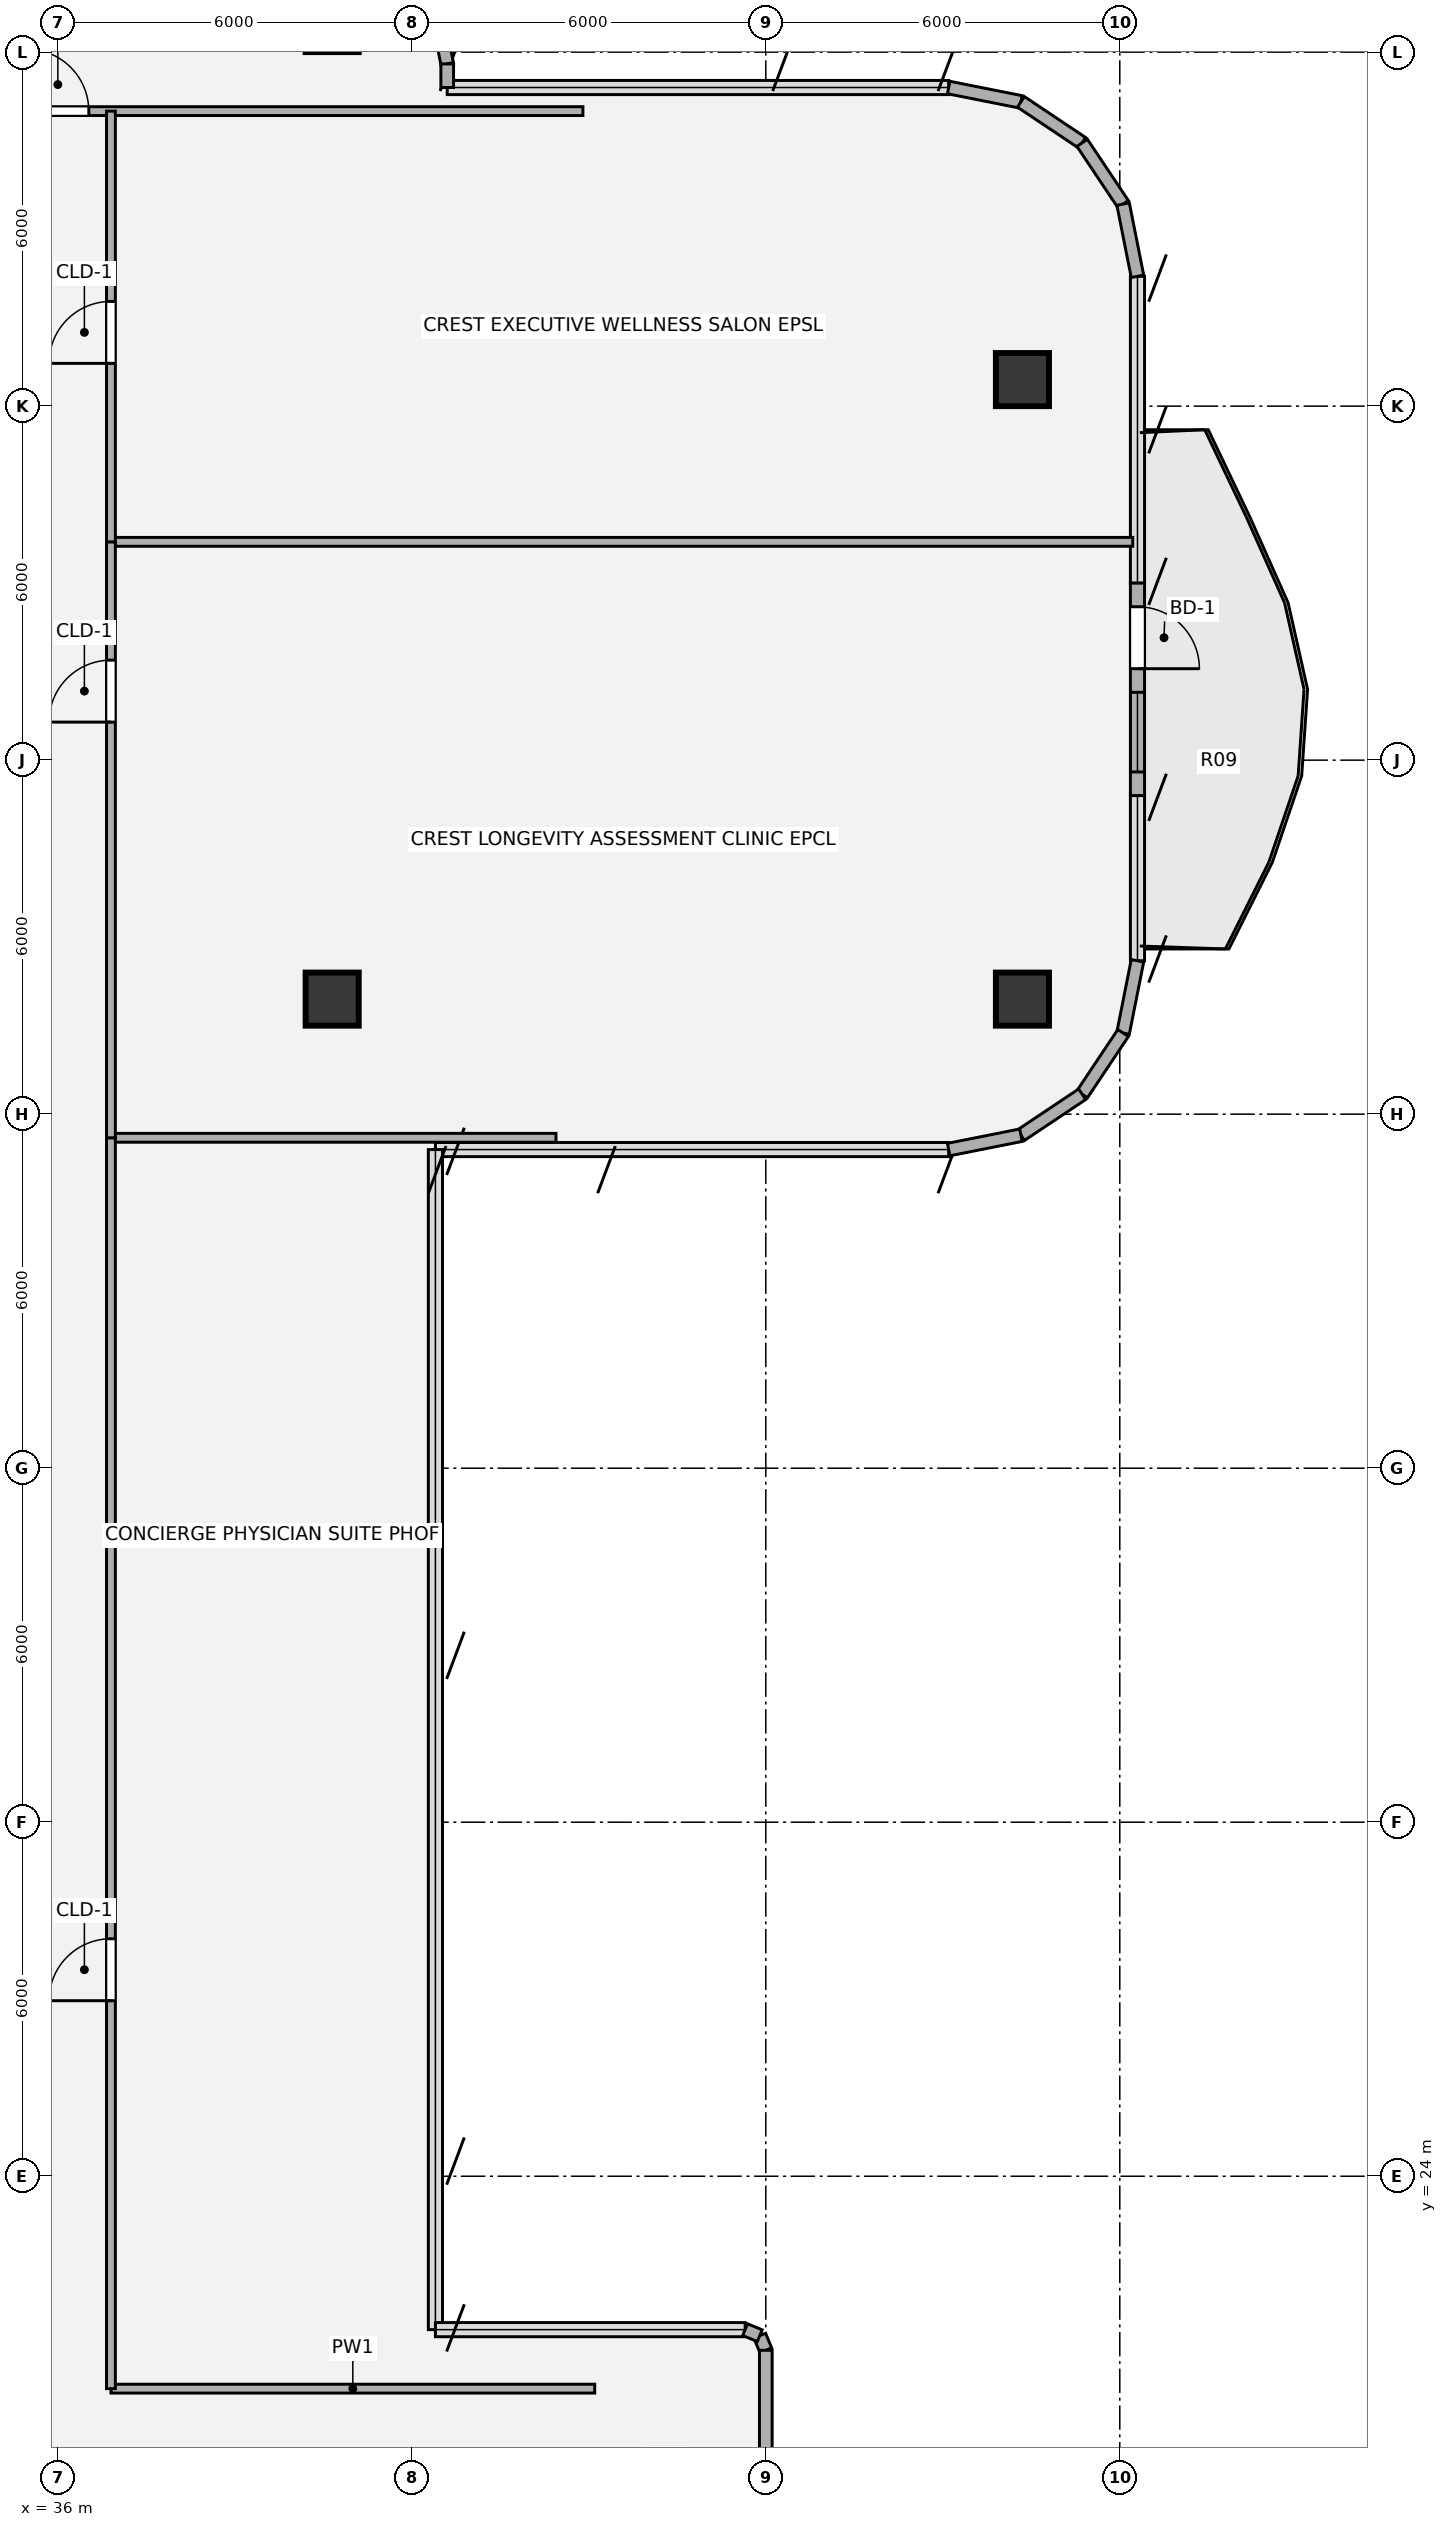
"""IFC4 building model, lengths in metres.
Left out: names, types, materials, properties, quantities, classifications, styles, units other than length and angle.
Written with IfcOpenShell. Run it as: python <this file> out.ifc"""

import sys

from ifc_helpers import new_model, si_unit, direction, frame, frame_2d, origin, origin_2d, place, context, subcontext, project, spatial, rectangle, hollow_circle, extrude, source, transform, mapped, element, fill, save


model = new_model("IFC4")
c1 = context("Model", 3, precision=1e-05, world=origin(), true_north=direction((0.0, 1.0)))
c2 = subcontext(c1, "Body", "Model", "MODEL_VIEW")
j1 = project(units=[si_unit("LENGTHUNIT", "METRE"), si_unit("PLANEANGLEUNIT", "RADIAN")], contexts=[c1])
p1 = place(None, origin())
s1 = spatial("IfcSite", under=j1, at=p1, CompositionType="ELEMENT")
p2 = place(p1, origin())
s2 = spatial("IfcBuilding", under=s1, at=p2, CompositionType="ELEMENT")
p3 = place(p2, frame((0.0, 0.0, 283.5)))
s3 = spatial("IfcBuildingStorey", under=s2, at=p3, CompositionType="ELEMENT", Elevation=283.5)
m1 = source(origin(), c2, "Body", "SweptSolid", [
    extrude(hollow_circle(Radius=0.45, WallThickness=0.032, at=origin_2d()), origin(), (0.0, 0.0, 1.0), 3.78),
])
for number, where, z_axis, x_axis in (
    (1, (52.35, 43.95, 0.0), (0.0, 0.0, 1.0), (1.0, 0.0, 0.0)),
    (2, (52.35, 54.45, 0.0), (0.0, 0.0, 1.0), (1.0, 0.0, 0.0)),
    (3, (40.65, 43.95, 0.0), (0.0, 0.0, 1.0), (1.0, 0.0, 0.0)),
):
    element("IfcColumn", number, at=place(p3, frame(where, z_axis=z_axis, x_axis=x_axis)), inside=s3, PredefinedType="COLUMN", context=c2, shape_type="MappedRepresentation", body=[
        mapped(m1, transform((0.0, 0.0, 0.0), x_axis=(1.0, 0.0, 0.0), y_axis=(0.0, 1.0, 0.0), z_axis=(0.0, 0.0, 1.0), scale=1.0)),
    ])
p4 = place(p3, frame((47.897, 21.298, 0.0), z_axis=(0.0, 0.0, 1.0), x_axis=(0.382673670509, -0.923883575944, 0.0)))
e4 = element("IfcWall", 4, at=p4, inside=s3, PredefinedType="SOLIDWALL", context=c2, shape_type="SweptSolid", body=[
    extrude(rectangle(XDim=0.268, YDim=0.215, at=frame_2d((0.134, 0.0))), origin(), (0.0, 0.0, 1.0), 3.53),
])
p5 = place(p3, frame((48.0, 21.05, 0.0), z_axis=(0.0, 0.0, 1.0), x_axis=(0.0, -1.0, 0.0)))
e5 = element("IfcWall", 5, at=p5, inside=s3, PredefinedType="SOLIDWALL", context=c2, shape_type="SweptSolid", body=[
    extrude(rectangle(XDim=2.77, YDim=0.215, at=frame_2d((1.385, 0.0))), origin(), (0.0, 0.0, 1.0), 2.718),
])
p6 = place(p3, frame((42.402, 60.795, 0.0), z_axis=(0.0, 0.0, 1.0), x_axis=(0.195190360752, -0.980765376158, 0.0)))
e6 = element("IfcWall", 6, at=p6, inside=s3, PredefinedType="SOLIDWALL", context=c2, shape_type="SweptSolid", body=[
    extrude(rectangle(XDim=1.014, YDim=0.215, at=frame_2d((0.507, 0.0))), origin(), (0.0, 0.0, 1.0), 3.53),
])
p7 = place(p3, frame((42.6, 59.8, 0.0), z_axis=(0.0, 0.0, 1.0), x_axis=(0.0, -1.0, 0.0)))
e7 = element("IfcWall", 7, at=p7, inside=s3, PredefinedType="SOLIDWALL", context=c2, shape_type="SweptSolid", body=[
    extrude(rectangle(XDim=0.4, YDim=0.215, at=frame_2d((0.2, 0.0))), origin(), (0.0, 0.0, 1.0), 3.53),
])
for number, where, z_axis, x_axis in (
    (8, (51.1, 59.4, 0.0), (0.0, 0.0, 1.0), (0.981, -0.195, 0.0)),
    (9, (52.325, 59.156, 0.0), (0.0, 0.0, 1.0), (0.831, -0.556, 0.0)),
    (10, (53.363, 58.463, 0.0), (0.0, 0.0, 1.0), (0.556, -0.831, 0.0)),
    (11, (54.056, 57.425, 0.0), (0.0, 0.0, 1.0), (0.195, -0.981, 0.0)),
):
    element("IfcWall", number, at=place(p3, frame(where, z_axis=z_axis, x_axis=x_axis)), inside=s3, PredefinedType="SOLIDWALL", context=c2, shape_type="SweptSolid", body=[
        extrude(rectangle(XDim=1.249, YDim=0.215, at=frame_2d((0.624, 0.0))), origin(), (0.0, 0.0, 1.0), 3.53),
    ])
p8 = place(p3, frame((54.3, 51.0, 0.0), z_axis=(0.0, 0.0, 1.0), x_axis=(0.0, -1.0, 0.0)))
e12 = element("IfcWall", 12, at=p8, inside=s3, PredefinedType="SOLIDWALL", context=c2, shape_type="SweptSolid", body=[
    extrude(rectangle(XDim=3.6, YDim=0.24, at=frame_2d((1.8, 0.0))), origin(), (0.0, 0.0, 1.0), 3.53),
])
p9 = place(p8, frame((0.4, 0.0, 0.0)))
e13 = element("IfcOpeningElement", 13, at=p9, cuts=e12, PredefinedType="OPENING", context=c2, shape_type="SweptSolid", body=[
    extrude(rectangle(XDim=1.05, YDim=2.15, at=origin_2d()), frame((0.525, 0.13, 1.075), z_axis=(0.0, -1.0, 0.0), x_axis=(1.0, 0.0, 0.0)), (0.0, 0.0, 1.0), 0.26),
])
p10 = place(p8, frame((1.85, 0.0, 0.85)))
e14 = element("IfcOpeningElement", 14, at=p10, cuts=e12, PredefinedType="OPENING", context=c2, shape_type="SweptSolid", body=[
    extrude(rectangle(XDim=1.35, YDim=1.35, at=origin_2d()), frame((0.675, 0.13, 0.675), z_axis=(0.0, -1.0, 0.0), x_axis=(1.0, 0.0, 0.0)), (0.0, 0.0, 1.0), 0.26),
])
for number, where, z_axis, x_axis in (
    (15, (54.3, 44.6, 0.0), (0.0, 0.0, 1.0), (-0.195, -0.981, 0.0)),
    (16, (54.056, 43.375, 0.0), (0.0, 0.0, 1.0), (-0.556, -0.831, 0.0)),
    (17, (53.363, 42.337, 0.0), (0.0, 0.0, 1.0), (-0.831, -0.556, 0.0)),
    (18, (52.325, 41.644, 0.0), (0.0, 0.0, 1.0), (-0.981, -0.195, 0.0)),
):
    element("IfcWall", number, at=place(p3, frame(where, z_axis=z_axis, x_axis=x_axis)), inside=s3, PredefinedType="SOLIDWALL", context=c2, shape_type="SweptSolid", body=[
        extrude(rectangle(XDim=1.249, YDim=0.215, at=frame_2d((0.624, 0.0))), origin(), (0.0, 0.0, 1.0), 3.53),
    ])
p11 = place(p3, frame((47.65, 21.4, 0.0), z_axis=(0.0, 0.0, 1.0), x_axis=(0.924205486139, -0.381895560841, 0.0)))
e19 = element("IfcWall", 19, at=p11, inside=s3, PredefinedType="SOLIDWALL", context=c2, shape_type="SweptSolid", body=[
    extrude(rectangle(XDim=0.268, YDim=0.215, at=frame_2d((0.134, 0.0))), origin(), (0.0, 0.0, 1.0), 3.53),
])
p12 = place(p3, frame((36.9, 20.4, 0.0), z_axis=(0.0, 0.0, 1.0), x_axis=(1.0, 0.0, 0.0)))
e20 = element("IfcWall", 20, at=p12, inside=s3, PredefinedType="PARTITIONING", context=c2, shape_type="SweptSolid", body=[
    extrude(rectangle(XDim=8.2, YDim=0.15, at=frame_2d((4.1, 0.0))), origin(), (0.0, 0.0, 1.0), 3.5),
])
p13 = place(p3, frame((36.9, 41.6, 0.0), z_axis=(0.0, 0.0, 1.0), x_axis=(1.0, 0.0, 0.0)))
e21 = element("IfcWall", 21, at=p13, inside=s3, PredefinedType="PARTITIONING", context=c2, shape_type="SweptSolid", body=[
    extrude(rectangle(XDim=7.543, YDim=0.15, at=frame_2d((3.772, 0.0))), origin(), (0.0, 0.0, 1.0), 3.5),
])
p14 = place(p3, frame((36.9, 51.7, 0.0), z_axis=(0.0, 0.0, 1.0), x_axis=(1.0, 0.0, 0.0)))
e22 = element("IfcWall", 22, at=p14, inside=s3, PredefinedType="PARTITIONING", context=c2, shape_type="SweptSolid", body=[
    extrude(rectangle(XDim=17.32, YDim=0.15, at=frame_2d((8.66, 0.0))), origin(), (0.0, 0.0, 1.0), 3.055),
])
p15 = place(p3, frame((27.1, 59.0, 0.0), z_axis=(0.0, 0.0, 1.0), x_axis=(1.0, 0.0, 0.0)))
e23 = element("IfcWall", 23, at=p15, inside=s3, PredefinedType="PARTITIONING", context=c2, shape_type="SweptSolid", body=[
    extrude(rectangle(XDim=17.8, YDim=0.15, at=frame_2d((8.9, 0.0))), origin(), (0.0, 0.0, 1.0), 3.308),
])
p16 = place(p15, frame((8.375, 0.0, 0.0)))
e24 = element("IfcOpeningElement", 24, at=p16, cuts=e23, PredefinedType="OPENING", context=c2, shape_type="SweptSolid", body=[
    extrude(rectangle(XDim=1.05, YDim=2.1, at=origin_2d()), frame((0.525, 0.085, 1.05), z_axis=(0.0, -1.0, 0.0), x_axis=(1.0, 0.0, 0.0)), (0.0, 0.0, 1.0), 0.17),
])
p17 = place(p3, frame((36.9, 20.4, 0.0), z_axis=(0.0, 0.0, 1.0), x_axis=(0.0, 1.0, 0.0)))
e25 = element("IfcWall", 25, at=p17, inside=s3, PredefinedType="PARTITIONING", context=c2, shape_type="SweptSolid", body=[
    extrude(rectangle(XDim=21.2, YDim=0.15, at=frame_2d((10.6, 0.0))), origin(), (0.0, 0.0, 1.0), 3.5),
])
p18 = place(p17, frame((6.575, 0.0, 0.0)))
e26 = element("IfcOpeningElement", 26, at=p18, cuts=e25, PredefinedType="OPENING", context=c2, shape_type="SweptSolid", body=[
    extrude(rectangle(XDim=1.05, YDim=2.1, at=origin_2d()), frame((0.525, 0.085, 1.05), z_axis=(0.0, -1.0, 0.0), x_axis=(1.0, 0.0, 0.0)), (0.0, 0.0, 1.0), 0.17),
])
p19 = place(p3, frame((36.9, 41.6, 0.0), z_axis=(0.0, 0.0, 1.0), x_axis=(0.0, 1.0, 0.0)))
e27 = element("IfcWall", 27, at=p19, inside=s3, PredefinedType="PARTITIONING", context=c2, shape_type="SweptSolid", body=[
    extrude(rectangle(XDim=10.1, YDim=0.15, at=frame_2d((5.05, 0.0))), origin(), (0.0, 0.0, 1.0), 3.5),
])
p20 = place(p19, frame((7.045, 0.0, 0.0)))
e28 = element("IfcOpeningElement", 28, at=p20, cuts=e27, PredefinedType="OPENING", context=c2, shape_type="SweptSolid", body=[
    extrude(rectangle(XDim=1.05, YDim=2.1, at=origin_2d()), frame((0.525, 0.085, 1.05), z_axis=(0.0, -1.0, 0.0), x_axis=(1.0, 0.0, 0.0)), (0.0, 0.0, 1.0), 0.17),
])
p21 = place(p3, frame((36.9, 51.7, 0.0), z_axis=(0.0, 0.0, 1.0), x_axis=(0.0, 1.0, 0.0)))
e29 = element("IfcWall", 29, at=p21, inside=s3, PredefinedType="PARTITIONING", context=c2, shape_type="SweptSolid", body=[
    extrude(rectangle(XDim=7.3, YDim=0.15, at=frame_2d((3.65, 0.0))), origin(), (0.0, 0.0, 1.0), 3.5),
])
p22 = place(p21, frame((3.025, 0.0, 0.0)))
e30 = element("IfcOpeningElement", 30, at=p22, cuts=e29, PredefinedType="OPENING", context=c2, shape_type="SweptSolid", body=[
    extrude(rectangle(XDim=1.05, YDim=2.1, at=origin_2d()), frame((0.525, 0.085, 1.05), z_axis=(0.0, -1.0, 0.0), x_axis=(1.0, 0.0, 0.0)), (0.0, 0.0, 1.0), 0.17),
])
m2 = source(origin(), c2, "Body", "SweptSolid", [
    extrude(rectangle(XDim=1.05, YDim=2.15, at=origin_2d()), frame((0.525, 0.025, 1.075), z_axis=(0.0, -1.0, 0.0), x_axis=(1.0, 0.0, 0.0)), (0.0, 0.0, 1.0), 0.05),
])
p23 = place(p9, origin())
e31 = element("IfcDoor", 31, at=p23, inside=s3, OperationType="SINGLE_SWING_RIGHT", PredefinedType="DOOR", context=c2, shape_type="MappedRepresentation", body=[
    mapped(m2, transform((0.0, 0.0, 0.0), x_axis=(1.0, 0.0, 0.0), y_axis=(0.0, 1.0, 0.0), z_axis=(0.0, 0.0, 1.0), scale=1.0)),
])
fill(e13, e31)
m3 = source(origin(), c2, "Body", "SweptSolid", [
    extrude(rectangle(XDim=1.35, YDim=1.35, at=origin_2d()), frame((0.675, 0.03, 0.675), z_axis=(0.0, -1.0, 0.0), x_axis=(1.0, 0.0, 0.0)), (0.0, 0.0, 1.0), 0.06),
])
p24 = place(p10, origin())
e32 = element("IfcWindow", 32, at=p24, inside=s3, PartitioningType="SINGLE_PANEL", PredefinedType="WINDOW", context=c2, shape_type="MappedRepresentation", body=[
    mapped(m3, transform((0.0, 0.0, 0.0), x_axis=(1.0, 0.0, 0.0), y_axis=(0.0, 1.0, 0.0), z_axis=(0.0, 0.0, 1.0), scale=1.0)),
])
fill(e14, e32)
m4 = source(origin(), c2, "Body", "SweptSolid", [
    extrude(rectangle(XDim=1.05, YDim=2.1, at=origin_2d()), frame((0.525, 0.025, 1.05), z_axis=(0.0, -1.0, 0.0), x_axis=(1.0, 0.0, 0.0)), (0.0, 0.0, 1.0), 0.05),
])
p25 = place(p16, origin())
e33 = element("IfcDoor", 33, at=p25, inside=s3, OperationType="SINGLE_SWING_LEFT", PredefinedType="DOOR", context=c2, shape_type="MappedRepresentation", body=[
    mapped(m4, transform((0.0, 0.0, 0.0), x_axis=(1.0, 0.0, 0.0), y_axis=(0.0, 1.0, 0.0), z_axis=(0.0, 0.0, 1.0), scale=1.0)),
])
fill(e24, e33)
p26 = place(p18, origin())
e34 = element("IfcDoor", 34, at=p26, inside=s3, OperationType="SINGLE_SWING_LEFT", PredefinedType="DOOR", context=c2, shape_type="MappedRepresentation", body=[
    mapped(m4, transform((0.0, 0.0, 0.0), x_axis=(1.0, 0.0, 0.0), y_axis=(0.0, 1.0, 0.0), z_axis=(0.0, 0.0, 1.0), scale=1.0)),
])
fill(e26, e34)
p27 = place(p20, origin())
e35 = element("IfcDoor", 35, at=p27, inside=s3, OperationType="SINGLE_SWING_LEFT", PredefinedType="DOOR", context=c2, shape_type="MappedRepresentation", body=[
    mapped(m4, transform((0.0, 0.0, 0.0), x_axis=(1.0, 0.0, 0.0), y_axis=(0.0, 1.0, 0.0), z_axis=(0.0, 0.0, 1.0), scale=1.0)),
])
fill(e28, e35)
p28 = place(p22, origin())
e36 = element("IfcDoor", 36, at=p28, inside=s3, OperationType="SINGLE_SWING_LEFT", PredefinedType="DOOR", context=c2, shape_type="MappedRepresentation", body=[
    mapped(m4, transform((0.0, 0.0, 0.0), x_axis=(1.0, 0.0, 0.0), y_axis=(0.0, 1.0, 0.0), z_axis=(0.0, 0.0, 1.0), scale=1.0)),
])
fill(e30, e36)
save(model, sys.argv[1])
